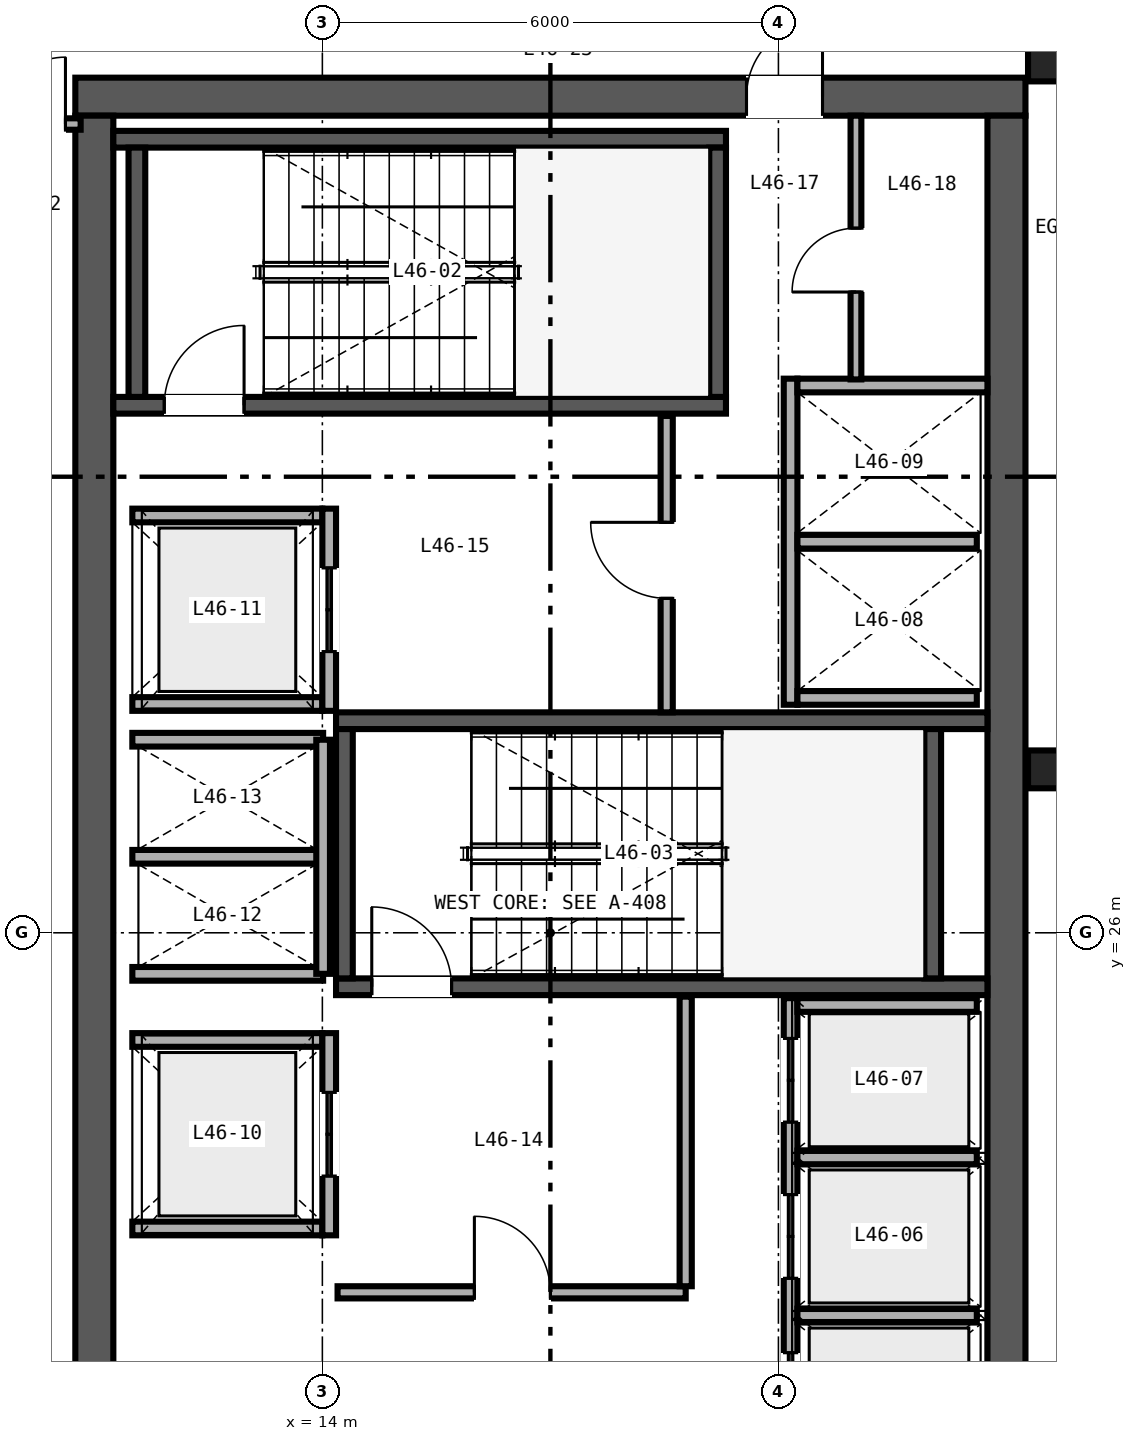
"""IFC4 building model, lengths in metres.
Left out: names, types, materials, properties, quantities, classifications, styles, units other than length and angle.
Written with IfcOpenShell. Run it as: python <this file> out.ifc"""

import sys

from ifc_helpers import new_model, si_unit, direction, frame, frame_2d, origin, origin_2d, place, context, subcontext, project, spatial, rectangle, i_section, extrude, source, transform, mapped, element, fill, save


model = new_model("IFC4")
c1 = context("Model", 3, precision=1e-05, world=origin(), true_north=direction((0.0, 1.0)))
c2 = subcontext(c1, "Body", "Model", "MODEL_VIEW")
j1 = project(units=[si_unit("LENGTHUNIT", "METRE"), si_unit("PLANEANGLEUNIT", "RADIAN")], contexts=[c1])
p1 = place(None, origin())
s1 = spatial("IfcSite", under=j1, at=p1, CompositionType="ELEMENT")
p2 = place(p1, origin())
s2 = spatial("IfcBuilding", under=s1, at=p2, CompositionType="ELEMENT")
p3 = place(p2, frame((0.0, 0.0, 184.8)))
s3 = spatial("IfcBuildingStorey", under=s2, at=p3, CompositionType="ELEMENT", Elevation=184.8)
p4 = place(p3, frame((10.75, 37.0, 0.0), z_axis=(0.0, 0.0, 1.0), x_axis=(1.0, 0.0, 0.0)))
e1 = element("IfcWall", 1, at=p4, inside=s3, PredefinedType="SHEAR", context=c2, shape_type="SweptSolid", body=[
    extrude(rectangle(XDim=12.5, YDim=0.5, at=frame_2d((6.25, 0.0))), origin(), (0.0, 0.0, 1.0), 3.37),
])
p5 = place(p4, frame((8.83, 0.0, 0.0)))
e2 = element("IfcOpeningElement", 2, at=p5, cuts=e1, PredefinedType="OPENING", context=c2, shape_type="SweptSolid", body=[
    extrude(rectangle(XDim=1.0, YDim=2.15, at=frame_2d((0.5, 1.075))), frame((0.0, 0.26, 0.0), z_axis=(0.0, -1.0, 0.0), x_axis=(1.0, 0.0, 0.0)), (0.0, 0.0, 1.0), 0.52),
])
for number, where, z_axis, x_axis in (
    (3, (11.0, 15.25, 0.0), (0.0, 0.0, 1.0), (0.0, 1.0, 0.0)),
    (4, (23.0, 15.25, 0.0), (0.0, 0.0, 1.0), (0.0, 1.0, 0.0)),
):
    element("IfcWall", number, at=place(p3, frame(where, z_axis=z_axis, x_axis=x_axis)), inside=s3, PredefinedType="SHEAR", context=c2, shape_type="SweptSolid", body=[
        extrude(rectangle(XDim=21.5, YDim=0.5, at=frame_2d((10.75, 0.0))), origin(), (0.0, 0.0, 1.0), 3.37),
    ])
p6 = place(p3, frame((11.25, 32.94, 0.0), z_axis=(0.0, 0.0, 1.0), x_axis=(1.0, 0.0, 0.0)))
e5 = element("IfcWall", 5, at=p6, inside=s3, PredefinedType="SHEAR", context=c2, shape_type="SweptSolid", body=[
    extrude(rectangle(XDim=8.06, YDim=0.22, at=frame_2d((4.03, 0.0))), origin(), (0.0, 0.0, 1.0), 3.4),
])
p7 = place(p6, frame((0.67, 0.0, 0.0)))
e6 = element("IfcOpeningElement", 6, at=p7, cuts=e5, PredefinedType="OPENING", context=c2, shape_type="SweptSolid", body=[
    extrude(rectangle(XDim=1.05, YDim=2.15, at=frame_2d((0.525, 1.075))), frame((0.0, 0.12, 0.0), z_axis=(0.0, -1.0, 0.0), x_axis=(1.0, 0.0, 0.0)), (0.0, 0.0, 1.0), 0.24),
])
p8 = place(p3, frame((11.25, 36.44, 0.0), z_axis=(0.0, 0.0, 1.0), x_axis=(1.0, 0.0, 0.0)))
e7 = element("IfcWall", 7, at=p8, inside=s3, PredefinedType="SHEAR", context=c2, shape_type="SweptSolid", body=[
    extrude(rectangle(XDim=8.06, YDim=0.22, at=frame_2d((4.03, 0.0))), origin(), (0.0, 0.0, 1.0), 3.4),
])
for number, where, z_axis, x_axis in (
    (8, (11.56, 33.05, 0.0), (0.0, 0.0, 1.0), (0.0, 1.0, 0.0)),
    (9, (19.2, 33.05, 0.0), (0.0, 0.0, 1.0), (0.0, 1.0, 0.0)),
):
    element("IfcWall", number, at=place(p3, frame(where, z_axis=z_axis, x_axis=x_axis)), inside=s3, PredefinedType="SHEAR", context=c2, shape_type="SweptSolid", body=[
        extrude(rectangle(XDim=3.28, YDim=0.22, at=frame_2d((1.64, 0.0))), origin(), (0.0, 0.0, 1.0), 3.4),
    ])
p9 = place(p3, frame((14.18, 25.29, 0.0), z_axis=(0.0, 0.0, 1.0), x_axis=(1.0, 0.0, 0.0)))
e10 = element("IfcWall", 10, at=p9, inside=s3, PredefinedType="SHEAR", context=c2, shape_type="SweptSolid", body=[
    extrude(rectangle(XDim=8.57, YDim=0.22, at=frame_2d((4.285, 0.0))), origin(), (0.0, 0.0, 1.0), 3.4),
])
p10 = place(p9, frame((0.47, 0.0, 0.0)))
e11 = element("IfcOpeningElement", 11, at=p10, cuts=e10, PredefinedType="OPENING", context=c2, shape_type="SweptSolid", body=[
    extrude(rectangle(XDim=1.05, YDim=2.15, at=frame_2d((0.525, 1.075))), frame((0.0, 0.12, 0.0), z_axis=(0.0, -1.0, 0.0), x_axis=(1.0, 0.0, 0.0)), (0.0, 0.0, 1.0), 0.24),
])
p11 = place(p3, frame((14.18, 28.79, 0.0), z_axis=(0.0, 0.0, 1.0), x_axis=(1.0, 0.0, 0.0)))
e12 = element("IfcWall", 12, at=p11, inside=s3, PredefinedType="SHEAR", context=c2, shape_type="SweptSolid", body=[
    extrude(rectangle(XDim=8.57, YDim=0.22, at=frame_2d((4.285, 0.0))), origin(), (0.0, 0.0, 1.0), 3.4),
])
for number, where, z_axis, x_axis in (
    (13, (14.29, 25.4, 0.0), (0.0, 0.0, 1.0), (0.0, 1.0, 0.0)),
    (14, (22.03, 25.4, 0.0), (0.0, 0.0, 1.0), (0.0, 1.0, 0.0)),
):
    element("IfcWall", number, at=place(p3, frame(where, z_axis=z_axis, x_axis=x_axis)), inside=s3, PredefinedType="SHEAR", context=c2, shape_type="SweptSolid", body=[
        extrude(rectangle(XDim=3.28, YDim=0.22, at=frame_2d((1.64, 0.0))), origin(), (0.0, 0.0, 1.0), 3.4),
    ])
m1 = source(origin(), c2, "Body", "SweptSolid", [
    extrude(i_section(OverallWidth=0.432, OverallDepth=0.498, WebThickness=0.056, FlangeThickness=0.089, FilletRadius=0.025, at=origin_2d()), origin(), (0.0, 0.0, 1.0), 3.37),
])
for number, where, z_axis, x_axis in (
    (15, (23.5, 28.15, 0.0), (0.0, 0.0, 1.0), (1.0, 0.0, 0.0)),
    (16, (23.5, 37.45, 0.0), (0.0, 0.0, 1.0), (1.0, 0.0, 0.0)),
):
    element("IfcColumn", number, at=place(p3, frame(where, z_axis=z_axis, x_axis=x_axis)), inside=s3, PredefinedType="COLUMN", context=c2, shape_type="MappedRepresentation", body=[
        mapped(m1, transform((0.0, 0.0, 0.0), scale=1.0)),
    ])
p12 = place(p3, frame((20.16, 18.82, 0.0), z_axis=(0.0, 0.0, 1.0), x_axis=(0.0, 1.0, 0.0)))
e17 = element("IfcWall", 17, at=p12, inside=s3, PredefinedType="SOLIDWALL", context=c2, shape_type="SweptSolid", body=[
    extrude(rectangle(XDim=6.32, YDim=0.18, at=frame_2d((3.16, 0.0))), origin(), (0.0, 0.0, 1.0), 2.47),
])
p13 = place(p12, frame((0.555, 0.0, 0.0)))
e18 = element("IfcOpeningElement", 18, at=p13, cuts=e17, PredefinedType="OPENING", context=c2, shape_type="SweptSolid", body=[
    extrude(rectangle(XDim=1.1, YDim=2.2, at=frame_2d((0.55, 1.1))), frame((0.0, 0.1, 0.0), z_axis=(0.0, -1.0, 0.0), x_axis=(1.0, 0.0, 0.0)), (0.0, 0.0, 1.0), 0.2),
])
p14 = place(p12, frame((2.635, 0.0, 0.0)))
e19 = element("IfcOpeningElement", 19, at=p14, cuts=e17, PredefinedType="OPENING", context=c2, shape_type="SweptSolid", body=[
    extrude(rectangle(XDim=1.1, YDim=2.2, at=frame_2d((0.55, 1.1))), frame((0.0, 0.1, 0.0), z_axis=(0.0, -1.0, 0.0), x_axis=(1.0, 0.0, 0.0)), (0.0, 0.0, 1.0), 0.2),
])
p15 = place(p12, frame((4.69, 0.0, 0.0)))
e20 = element("IfcOpeningElement", 20, at=p15, cuts=e17, PredefinedType="OPENING", context=c2, shape_type="SweptSolid", body=[
    extrude(rectangle(XDim=1.1, YDim=2.2, at=frame_2d((0.55, 1.1))), frame((0.0, 0.1, 0.0), z_axis=(0.0, -1.0, 0.0), x_axis=(1.0, 0.0, 0.0)), (0.0, 0.0, 1.0), 0.2),
])
p16 = place(p3, frame((20.25, 25.05, 0.0), z_axis=(0.0, 0.0, 1.0), x_axis=(1.0, 0.0, 0.0)))
e21 = element("IfcWall", 21, at=p16, inside=s3, PredefinedType="SOLIDWALL", context=c2, shape_type="SweptSolid", body=[
    extrude(rectangle(XDim=2.36, YDim=0.18, at=frame_2d((1.18, 0.0))), origin(), (0.0, 0.0, 1.0), 3.37),
])
p17 = place(p3, frame((20.25, 20.965, 0.0), z_axis=(0.0, 0.0, 1.0), x_axis=(1.0, 0.0, 0.0)))
e22 = element("IfcWall", 22, at=p17, inside=s3, PredefinedType="SOLIDWALL", context=c2, shape_type="SweptSolid", body=[
    extrude(rectangle(XDim=2.36, YDim=0.18, at=frame_2d((1.18, 0.0))), origin(), (0.0, 0.0, 1.0), 2.47),
])
p18 = place(p3, frame((20.25, 23.045, 0.0), z_axis=(0.0, 0.0, 1.0), x_axis=(1.0, 0.0, 0.0)))
e23 = element("IfcWall", 23, at=p18, inside=s3, PredefinedType="SOLIDWALL", context=c2, shape_type="SweptSolid", body=[
    extrude(rectangle(XDim=2.36, YDim=0.18, at=frame_2d((1.18, 0.0))), origin(), (0.0, 0.0, 1.0), 3.37),
])
p19 = place(p3, frame((20.16, 29.0, 0.0), z_axis=(0.0, 0.0, 1.0), x_axis=(0.0, 1.0, 0.0)))
e24 = element("IfcWall", 24, at=p19, inside=s3, PredefinedType="SOLIDWALL", context=c2, shape_type="SweptSolid", body=[
    extrude(rectangle(XDim=4.29, YDim=0.18, at=frame_2d((2.145, 0.0))), origin(), (0.0, 0.0, 1.0), 3.37),
])
p20 = place(p3, frame((20.25, 29.09, 0.0), z_axis=(0.0, 0.0, 1.0), x_axis=(1.0, 0.0, 0.0)))
e25 = element("IfcWall", 25, at=p20, inside=s3, PredefinedType="SOLIDWALL", context=c2, shape_type="SweptSolid", body=[
    extrude(rectangle(XDim=2.36, YDim=0.18, at=frame_2d((1.18, 0.0))), origin(), (0.0, 0.0, 1.0), 3.37),
])
p21 = place(p3, frame((20.25, 33.2, 0.0), z_axis=(0.0, 0.0, 1.0), x_axis=(1.0, 0.0, 0.0)))
e26 = element("IfcWall", 26, at=p21, inside=s3, PredefinedType="SOLIDWALL", context=c2, shape_type="SweptSolid", body=[
    extrude(rectangle(XDim=2.5, YDim=0.18, at=frame_2d((1.25, 0.0))), origin(), (0.0, 0.0, 1.0), 3.37),
])
p22 = place(p3, frame((20.25, 31.145, 0.0), z_axis=(0.0, 0.0, 1.0), x_axis=(1.0, 0.0, 0.0)))
e27 = element("IfcWall", 27, at=p22, inside=s3, PredefinedType="SOLIDWALL", context=c2, shape_type="SweptSolid", body=[
    extrude(rectangle(XDim=2.36, YDim=0.18, at=frame_2d((1.18, 0.0))), origin(), (0.0, 0.0, 1.0), 3.37),
])
for number, where, z_axis, x_axis in (
    (28, (11.5, 22.11, 0.0), (0.0, 0.0, 1.0), (1.0, 0.0, 0.0)),
    (29, (11.5, 24.59, 0.0), (0.0, 0.0, 1.0), (1.0, 0.0, 0.0)),
):
    element("IfcWall", number, at=place(p3, frame(where, z_axis=z_axis, x_axis=x_axis)), inside=s3, PredefinedType="SOLIDWALL", context=c2, shape_type="SweptSolid", body=[
        extrude(rectangle(XDim=2.5, YDim=0.18, at=frame_2d((1.25, 0.0))), origin(), (0.0, 0.0, 1.0), 3.37),
    ])
p23 = place(p3, frame((14.09, 22.02, 0.0), z_axis=(0.0, 0.0, 1.0), x_axis=(0.0, 1.0, 0.0)))
e30 = element("IfcWall", 30, at=p23, inside=s3, PredefinedType="SOLIDWALL", context=c2, shape_type="SweptSolid", body=[
    extrude(rectangle(XDim=2.66, YDim=0.18, at=frame_2d((1.33, 0.0))), origin(), (0.0, 0.0, 1.0), 3.37),
])
p24 = place(p23, frame((0.78, 0.0, 0.0)))
e31 = element("IfcOpeningElement", 31, at=p24, cuts=e30, PredefinedType="OPENING", context=c2, shape_type="SweptSolid", body=[
    extrude(rectangle(XDim=1.1, YDim=2.2, at=frame_2d((0.55, 1.1))), frame((0.0, 0.1, 0.0), z_axis=(0.0, -1.0, 0.0), x_axis=(1.0, 0.0, 0.0)), (0.0, 0.0, 1.0), 0.2),
])
for number, where, z_axis, x_axis in (
    (32, (11.5, 29.01, 0.0), (0.0, 0.0, 1.0), (1.0, 0.0, 0.0)),
    (33, (11.5, 31.49, 0.0), (0.0, 0.0, 1.0), (1.0, 0.0, 0.0)),
):
    element("IfcWall", number, at=place(p3, frame(where, z_axis=z_axis, x_axis=x_axis)), inside=s3, PredefinedType="SOLIDWALL", context=c2, shape_type="SweptSolid", body=[
        extrude(rectangle(XDim=2.5, YDim=0.18, at=frame_2d((1.25, 0.0))), origin(), (0.0, 0.0, 1.0), 3.37),
    ])
p25 = place(p3, frame((14.09, 28.92, 0.0), z_axis=(0.0, 0.0, 1.0), x_axis=(0.0, 1.0, 0.0)))
e34 = element("IfcWall", 34, at=p25, inside=s3, PredefinedType="SOLIDWALL", context=c2, shape_type="SweptSolid", body=[
    extrude(rectangle(XDim=2.66, YDim=0.18, at=frame_2d((1.33, 0.0))), origin(), (0.0, 0.0, 1.0), 3.37),
])
p26 = place(p25, frame((0.78, 0.0, 0.0)))
e35 = element("IfcOpeningElement", 35, at=p26, cuts=e34, PredefinedType="OPENING", context=c2, shape_type="SweptSolid", body=[
    extrude(rectangle(XDim=1.1, YDim=2.2, at=frame_2d((0.55, 1.1))), frame((0.0, 0.1, 0.0), z_axis=(0.0, -1.0, 0.0), x_axis=(1.0, 0.0, 0.0)), (0.0, 0.0, 1.0), 0.2),
])
for number, where, z_axis, x_axis in (
    (36, (11.5, 25.46, 0.0), (0.0, 0.0, 1.0), (1.0, 0.0, 0.0)),
    (37, (11.5, 27.0, 0.0), (0.0, 0.0, 1.0), (1.0, 0.0, 0.0)),
    (38, (11.5, 28.54, 0.0), (0.0, 0.0, 1.0), (1.0, 0.0, 0.0)),
):
    element("IfcWall", number, at=place(p3, frame(where, z_axis=z_axis, x_axis=x_axis)), inside=s3, PredefinedType="SOLIDWALL", context=c2, shape_type="SweptSolid", body=[
        extrude(rectangle(XDim=2.51, YDim=0.18, at=frame_2d((1.255, 0.0))), origin(), (0.0, 0.0, 1.0), 3.37),
    ])
p27 = place(p3, frame((14.01, 25.46, 0.0), z_axis=(0.0, 0.0, 1.0), x_axis=(0.0, 1.0, 0.0)))
e39 = element("IfcWall", 39, at=p27, inside=s3, PredefinedType="SOLIDWALL", context=c2, shape_type="SweptSolid", body=[
    extrude(rectangle(XDim=3.08, YDim=0.18, at=frame_2d((1.54, 0.0))), origin(), (0.0, 0.0, 1.0), 3.37),
])
p28 = place(p3, frame((14.2, 21.27, 0.0), z_axis=(0.0, 0.0, 1.0), x_axis=(1.0, 0.0, 0.0)))
e40 = element("IfcWall", 40, at=p28, inside=s3, PredefinedType="PARTITIONING", context=c2, shape_type="SweptSolid", body=[
    extrude(rectangle(XDim=4.58, YDim=0.16, at=frame_2d((2.29, 0.0))), origin(), (0.0, 0.0, 1.0), 3.37),
])
p29 = place(p28, frame((1.8, 0.0, 0.0)))
e41 = element("IfcOpeningElement", 41, at=p29, cuts=e40, PredefinedType="OPENING", context=c2, shape_type="SweptSolid", body=[
    extrude(rectangle(XDim=1.0, YDim=2.15, at=frame_2d((0.5, 1.075))), frame((0.0, 0.09, 0.0), z_axis=(0.0, -1.0, 0.0), x_axis=(1.0, 0.0, 0.0)), (0.0, 0.0, 1.0), 0.18),
])
p30 = place(p3, frame((18.78, 21.35, 0.0), z_axis=(0.0, 0.0, 1.0), x_axis=(0.0, 1.0, 0.0)))
e42 = element("IfcWall", 42, at=p30, inside=s3, PredefinedType="PARTITIONING", context=c2, shape_type="SweptSolid", body=[
    extrude(rectangle(XDim=3.81, YDim=0.16, at=frame_2d((1.905, 0.0))), origin(), (0.0, 0.0, 1.0), 3.37),
])
p31 = place(p3, frame((18.53, 28.9, 0.0), z_axis=(0.0, 0.0, 1.0), x_axis=(0.0, 1.0, 0.0)))
e43 = element("IfcWall", 43, at=p31, inside=s3, PredefinedType="PARTITIONING", context=c2, shape_type="SweptSolid", body=[
    extrude(rectangle(XDim=3.9, YDim=0.16, at=frame_2d((1.95, 0.0))), origin(), (0.0, 0.0, 1.0), 3.37),
])
p32 = place(p31, frame((1.5, 0.0, 0.0)))
e44 = element("IfcOpeningElement", 44, at=p32, cuts=e43, PredefinedType="OPENING", context=c2, shape_type="SweptSolid", body=[
    extrude(rectangle(XDim=1.0, YDim=2.15, at=frame_2d((0.5, 1.075))), frame((0.0, 0.09, 0.0), z_axis=(0.0, -1.0, 0.0), x_axis=(1.0, 0.0, 0.0)), (0.0, 0.0, 1.0), 0.18),
])
p33 = place(p3, frame((21.02, 33.28, 0.0), z_axis=(0.0, 0.0, 1.0), x_axis=(0.0, 1.0, 0.0)))
e45 = element("IfcWall", 45, at=p33, inside=s3, PredefinedType="PARTITIONING", context=c2, shape_type="SweptSolid", body=[
    extrude(rectangle(XDim=3.47, YDim=0.142, at=frame_2d((1.735, 0.0))), origin(), (0.0, 0.0, 1.0), 3.37),
])
p34 = place(p33, frame((1.15, 0.0, 0.0)))
e46 = element("IfcOpeningElement", 46, at=p34, cuts=e45, PredefinedType="OPENING", context=c2, shape_type="SweptSolid", body=[
    extrude(rectangle(XDim=0.84, YDim=2.1, at=frame_2d((0.42, 1.05))), frame((0.0, 0.081, 0.0), z_axis=(0.0, -1.0, 0.0), x_axis=(1.0, 0.0, 0.0)), (0.0, 0.0, 1.0), 0.162),
])
p35 = place(p3, frame((8.16, 36.64, 0.0), z_axis=(0.0, 0.0, 1.0), x_axis=(1.0, 0.0, 0.0)))
e47 = element("IfcWall", 47, at=p35, inside=s3, PredefinedType="PARTITIONING", context=c2, shape_type="SweptSolid", body=[
    extrude(rectangle(XDim=2.66, YDim=0.15, at=frame_2d((1.33, 0.0))), origin(), (0.0, 0.0, 1.0), 2.753),
])
p36 = place(p35, frame((1.58, 0.0, 0.0)))
e48 = element("IfcOpeningElement", 48, at=p36, cuts=e47, PredefinedType="OPENING", context=c2, shape_type="SweptSolid", body=[
    extrude(rectangle(XDim=0.88, YDim=2.15, at=frame_2d((0.44, 1.075))), frame((0.0, 0.085, 0.0), z_axis=(0.0, -1.0, 0.0), x_axis=(1.0, 0.0, 0.0)), (0.0, 0.0, 1.0), 0.17),
])
m2 = source(origin(), c2, "Body", "SweptSolid", [
    extrude(rectangle(XDim=1.05, YDim=2.15, at=frame_2d((0.525, 1.075))), frame((0.0, 0.025, 0.0), z_axis=(0.0, -1.0, 0.0), x_axis=(1.0, 0.0, 0.0)), (0.0, 0.0, 1.0), 0.05),
])
p37 = place(p7, origin())
e49 = element("IfcDoor", 49, at=p37, inside=s3, OperationType="SINGLE_SWING_RIGHT", PredefinedType="DOOR", context=c2, shape_type="MappedRepresentation", body=[
    mapped(m2, transform((0.0, 0.0, 0.0), scale=1.0)),
])
fill(e6, e49)
p38 = place(p10, origin())
e50 = element("IfcDoor", 50, at=p38, inside=s3, OperationType="SINGLE_SWING_LEFT", PredefinedType="DOOR", context=c2, shape_type="MappedRepresentation", body=[
    mapped(m2, transform((0.0, 0.0, 0.0), scale=1.0)),
])
fill(e11, e50)
m3 = source(origin(), c2, "Body", "SweptSolid", [
    extrude(rectangle(XDim=1.1, YDim=2.2, at=frame_2d((0.55, 1.1))), frame((0.0, 0.025, 0.0), z_axis=(0.0, -1.0, 0.0), x_axis=(1.0, 0.0, 0.0)), (0.0, 0.0, 1.0), 0.05),
])
p39 = place(p13, origin())
e51 = element("IfcDoor", 51, at=p39, inside=s3, OperationType="DOUBLE_DOOR_SLIDING", PredefinedType="DOOR", context=c2, shape_type="MappedRepresentation", body=[
    mapped(m3, transform((0.0, 0.0, 0.0), scale=1.0)),
])
fill(e18, e51)
p40 = place(p14, origin())
e52 = element("IfcDoor", 52, at=p40, inside=s3, OperationType="DOUBLE_DOOR_SLIDING", PredefinedType="DOOR", context=c2, shape_type="MappedRepresentation", body=[
    mapped(m3, transform((0.0, 0.0, 0.0), scale=1.0)),
])
fill(e19, e52)
p41 = place(p15, origin())
e53 = element("IfcDoor", 53, at=p41, inside=s3, OperationType="DOUBLE_DOOR_SLIDING", PredefinedType="DOOR", context=c2, shape_type="MappedRepresentation", body=[
    mapped(m3, transform((0.0, 0.0, 0.0), scale=1.0)),
])
fill(e20, e53)
p42 = place(p24, origin())
e54 = element("IfcDoor", 54, at=p42, inside=s3, OperationType="DOUBLE_DOOR_SLIDING", PredefinedType="DOOR", context=c2, shape_type="MappedRepresentation", body=[
    mapped(m3, transform((0.0, 0.0, 0.0), scale=1.0)),
])
fill(e31, e54)
p43 = place(p26, origin())
e55 = element("IfcDoor", 55, at=p43, inside=s3, OperationType="DOUBLE_DOOR_SLIDING", PredefinedType="DOOR", context=c2, shape_type="MappedRepresentation", body=[
    mapped(m3, transform((0.0, 0.0, 0.0), scale=1.0)),
])
fill(e35, e55)
m4 = source(origin(), c2, "Body", "SweptSolid", [
    extrude(rectangle(XDim=1.0, YDim=2.15, at=frame_2d((0.5, 1.075))), frame((0.0, 0.025, 0.0), z_axis=(0.0, -1.0, 0.0), x_axis=(1.0, 0.0, 0.0)), (0.0, 0.0, 1.0), 0.05),
])
p44 = place(p29, origin())
e56 = element("IfcDoor", 56, at=p44, inside=s3, OperationType="SINGLE_SWING_LEFT", PredefinedType="DOOR", context=c2, shape_type="MappedRepresentation", body=[
    mapped(m4, transform((0.0, 0.0, 0.0), scale=1.0)),
])
fill(e41, e56)
p45 = place(p32, origin())
e57 = element("IfcDoor", 57, at=p45, inside=s3, OperationType="SINGLE_SWING_RIGHT", PredefinedType="DOOR", context=c2, shape_type="MappedRepresentation", body=[
    mapped(m4, transform((0.0, 0.0, 0.0), scale=1.0)),
])
fill(e44, e57)
m5 = source(origin(), c2, "Body", "SweptSolid", [
    extrude(rectangle(XDim=0.84, YDim=2.1, at=frame_2d((0.42, 1.05))), frame((0.0, 0.025, 0.0), z_axis=(0.0, -1.0, 0.0), x_axis=(1.0, 0.0, 0.0)), (0.0, 0.0, 1.0), 0.05),
])
p46 = place(p34, origin())
e58 = element("IfcDoor", 58, at=p46, inside=s3, OperationType="SINGLE_SWING_LEFT", PredefinedType="DOOR", context=c2, shape_type="MappedRepresentation", body=[
    mapped(m5, transform((0.0, 0.0, 0.0), scale=1.0)),
])
fill(e46, e58)
p47 = place(p5, origin())
e59 = element("IfcDoor", 59, at=p47, inside=s3, OperationType="SINGLE_SWING_RIGHT", PredefinedType="DOOR", context=c2, shape_type="MappedRepresentation", body=[
    mapped(m4, transform((0.0, 0.0, 0.0), scale=1.0)),
])
fill(e2, e59)
m6 = source(origin(), c2, "Body", "SweptSolid", [
    extrude(rectangle(XDim=0.88, YDim=2.15, at=frame_2d((0.44, 1.075))), frame((0.0, 0.025, 0.0), z_axis=(0.0, -1.0, 0.0), x_axis=(1.0, 0.0, 0.0)), (0.0, 0.0, 1.0), 0.05),
])
p48 = place(p36, origin())
e60 = element("IfcDoor", 60, at=p48, inside=s3, OperationType="SINGLE_SWING_RIGHT", PredefinedType="DOOR", context=c2, shape_type="MappedRepresentation", body=[
    mapped(m6, transform((0.0, 0.0, 0.0), scale=1.0)),
])
fill(e48, e60)
save(model, sys.argv[1])
